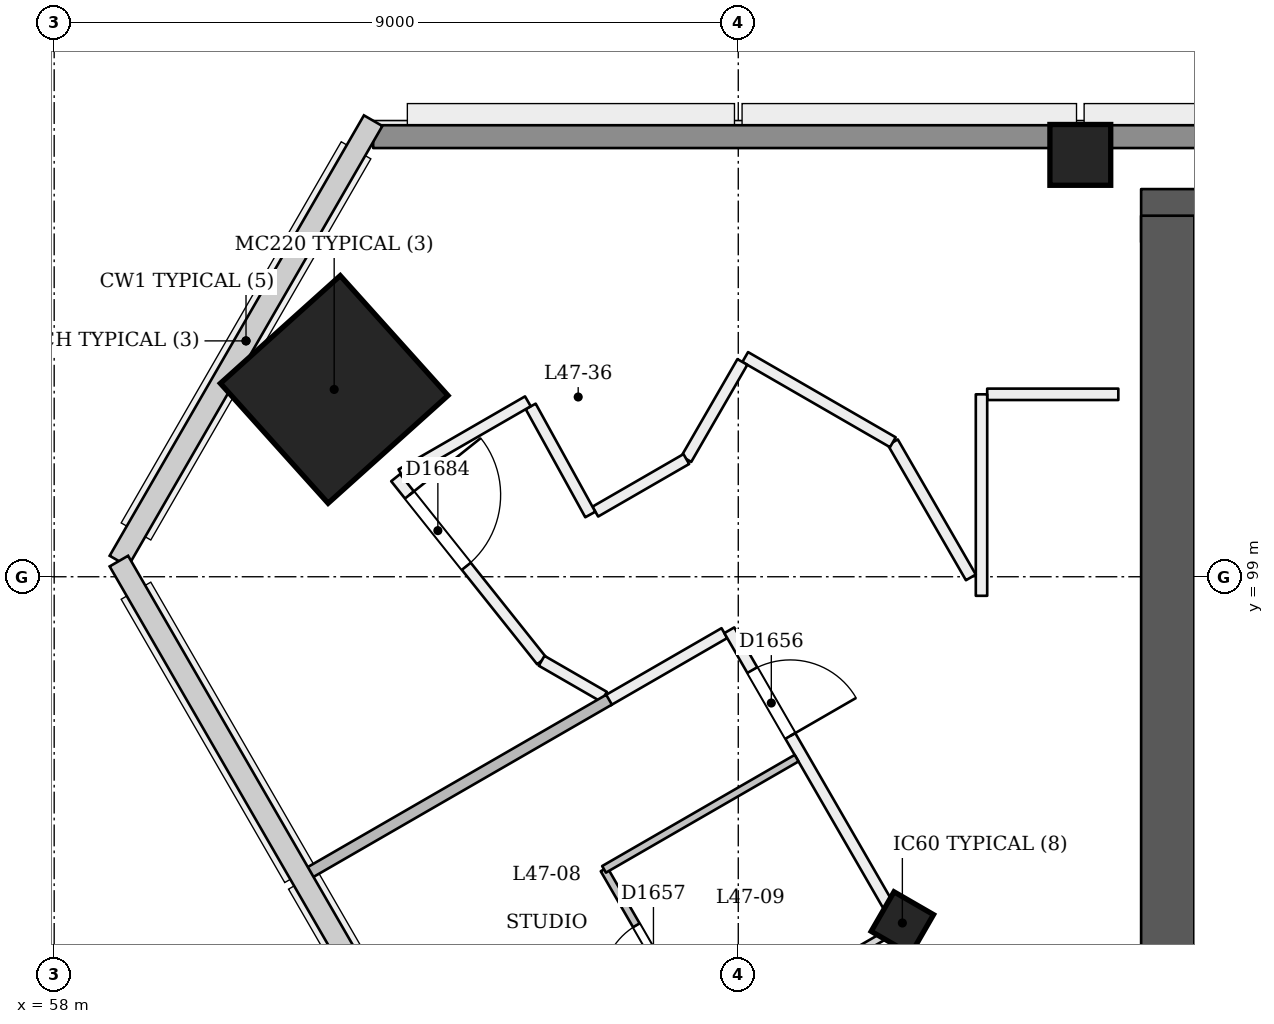
"""IFC4 building model, lengths in metres.
Left out: names, types, materials, properties, quantities, classifications, styles, units other than length and angle.
Written with IfcOpenShell. Run it as: python <this file> out.ifc"""

import sys

from ifc_helpers import new_model, si_unit, direction, frame, frame_2d, origin, origin_2d, place, context, subcontext, project, spatial, rectangle, extrude, element, fill, save


model = new_model("IFC4")
c1 = context("Model", 3, precision=1e-05, world=origin(), true_north=direction((0.0, 1.0)))
c2 = subcontext(c1, "Body", "Model", "MODEL_VIEW")
j1 = project(units=[si_unit("LENGTHUNIT", "METRE"), si_unit("PLANEANGLEUNIT", "RADIAN")], contexts=[c1])
p1 = place(None, origin())
s1 = spatial("IfcSite", under=j1, at=p1, CompositionType="ELEMENT")
p2 = place(p1, origin())
s2 = spatial("IfcBuilding", under=s1, at=p2, CompositionType="ELEMENT")
p3 = place(p2, frame((0.0, 0.0, 181.8)))
s3 = spatial("IfcBuildingStorey", under=s2, at=p3, CompositionType="ELEMENT", Elevation=181.8)
p4 = place(p3, frame((97.35, 103.75, 0.0), z_axis=(0.0, 0.0, 1.0), x_axis=(-1.0, 0.0, 0.0)))
e1 = element("IfcWall", 1, at=p4, inside=s3, PredefinedType="SHEAR", context=c2, shape_type="SweptSolid", body=[
    extrude(rectangle(XDim=25.05, YDim=0.7, at=frame_2d((12.525, 0.0))), origin(), (0.0, 0.0, 1.0), 3.6),
])
p5 = place(p3, frame((72.65, 103.75, 0.0), z_axis=(0.0, 0.0, 1.0), x_axis=(0.0, -1.0, 0.0)))
e2 = element("IfcWall", 2, at=p5, inside=s3, PredefinedType="SHEAR", context=c2, shape_type="SweptSolid", body=[
    extrude(rectangle(XDim=11.05, YDim=0.7, at=frame_2d((5.525, 0.0))), origin(), (0.0, 0.0, 1.0), 3.6),
])
p6 = place(p3, frame((69.132, 94.398, -0.018), z_axis=(0.02215369191, 0.038413282303, 0.999016333038), x_axis=(-0.865360860763, -0.499675692985, 0.038402897016)))
e3 = element("IfcColumn", 3, at=p6, inside=s3, PredefinedType="COLUMN", context=c2, shape_type="SweptSolid", body=[
    extrude(rectangle(XDim=0.6, YDim=0.6, at=origin_2d()), origin(), (0.0, 0.0, 1.0), 3.604),
])
p7 = place(p3, frame((61.65, 101.453, 0.0), z_axis=(0.028403739082, 0.009219352065, 0.999554016126), x_axis=(-0.865117148267, 0.501172504354, 0.019960978266)))
e4 = element("IfcColumn", 4, at=p7, inside=s3, PredefinedType="COLUMN", context=c2, shape_type="SweptSolid", body=[
    extrude(rectangle(XDim=2.12, YDim=2.12, at=origin_2d()), origin(), (0.0, 0.0, 1.0), 3.602),
])
p8 = place(p3, frame((71.5, 104.55, 0.0), z_axis=(0.0, 0.0, 1.0), x_axis=(1.0, 0.0, 0.0)))
e5 = element("IfcColumn", 5, at=p8, inside=s3, PredefinedType="COLUMN", context=c2, shape_type="SweptSolid", body=[
    extrude(rectangle(XDim=0.8, YDim=0.8, at=origin_2d()), origin(), (0.0, 0.0, 1.0), 3.6),
])
p9 = place(p3, frame((65.28, 97.371, 0.0), z_axis=(0.0, 0.0, 1.0), x_axis=(0.865965678975, 0.50010343214, 0.0)))
e6 = element("IfcWall", 6, at=p9, inside=s3, PredefinedType="PARTITIONING", context=c2, shape_type="SweptSolid", body=[
    extrude(rectangle(XDim=1.775, YDim=0.15, at=frame_2d((0.887, 0.0))), origin(), (0.0, 0.0, 1.0), 3.15),
])
p10 = place(p3, frame((66.882, 98.296, 0.0), z_axis=(0.0, 0.0, 1.0), x_axis=(0.500009088543, -0.866020156448, 0.0)))
e7 = element("IfcWall", 7, at=p10, inside=s3, PredefinedType="PARTITIONING", context=c2, shape_type="SweptSolid", body=[
    extrude(rectangle(XDim=6.636, YDim=0.15, at=frame_2d((3.318, 0.0))), origin(), (0.0, 0.0, 1.0), 2.75),
])
p11 = place(p10, frame((0.605, 0.0, 0.0)))
e8 = element("IfcOpeningElement", 8, at=p11, cuts=e7, PredefinedType="OPENING", context=c2, shape_type="SweptSolid", body=[
    extrude(rectangle(XDim=1.0, YDim=2.1, at=frame_2d((0.5, 1.05))), frame((0.0, 0.085, 0.0), z_axis=(0.0, -1.0, 0.0), x_axis=(1.0, 0.0, 0.0)), (0.0, 0.0, 1.0), 0.171),
])
p12 = place(p3, frame((72.0, 101.4, 0.0), z_axis=(0.0, 0.0, 1.0), x_axis=(-1.0, 0.0, 0.0)))
e9 = element("IfcWall", 9, at=p12, inside=s3, PredefinedType="PARTITIONING", context=c2, shape_type="SweptSolid", body=[
    extrude(rectangle(XDim=1.725, YDim=0.15, at=frame_2d((0.863, 0.0))), origin(), (0.0, 0.0, 1.0), 3.15),
])
p13 = place(p3, frame((70.2, 101.4, 0.0), z_axis=(0.0, 0.0, 1.0), x_axis=(0.0, -1.0, 0.0)))
e10 = element("IfcWall", 10, at=p13, inside=s3, PredefinedType="PARTITIONING", context=c2, shape_type="SweptSolid", body=[
    extrude(rectangle(XDim=2.651, YDim=0.15, at=frame_2d((1.325, 0.0))), origin(), (0.0, 0.0, 1.0), 3.15),
])
p14 = place(p3, frame((70.06, 98.992, 0.0), z_axis=(0.0, 0.0, 1.0), x_axis=(-0.500027893485, 0.866009298874, 0.0)))
e11 = element("IfcWall", 11, at=p14, inside=s3, PredefinedType="PARTITIONING", context=c2, shape_type="SweptSolid", body=[
    extrude(rectangle(XDim=2.053, YDim=0.15, at=frame_2d((1.026, 0.0))), origin(), (0.0, 0.0, 1.0), 3.15),
])
p15 = place(p3, frame((69.034, 100.769, 0.0), z_axis=(0.0, 0.0, 1.0), x_axis=(-0.866016984105, 0.500014583029, 0.0)))
e12 = element("IfcWall", 12, at=p15, inside=s3, PredefinedType="PARTITIONING", context=c2, shape_type="SweptSolid", body=[
    extrude(rectangle(XDim=2.243, YDim=0.15, at=frame_2d((1.121, 0.0))), origin(), (0.0, 0.0, 1.0), 3.15),
])
p16 = place(p3, frame((67.054, 101.826, 0.0), z_axis=(0.0, 0.0, 1.0), x_axis=(-0.500037662692, -0.866003658127, 0.0)))
e13 = element("IfcWall", 13, at=p16, inside=s3, PredefinedType="PARTITIONING", context=c2, shape_type="SweptSolid", body=[
    extrude(rectangle(XDim=1.475, YDim=0.15, at=frame_2d((0.738, 0.0))), origin(), (0.0, 0.0, 1.0), 3.15),
])
p17 = place(p3, frame((66.316, 100.548, 0.0), z_axis=(0.0, 0.0, 1.0), x_axis=(-0.866050310653, -0.499956857557, 0.0)))
e14 = element("IfcWall", 14, at=p17, inside=s3, PredefinedType="PARTITIONING", context=c2, shape_type="SweptSolid", body=[
    extrude(rectangle(XDim=1.382, YDim=0.15, at=frame_2d((0.691, 0.0))), origin(), (0.0, 0.0, 1.0), 3.15),
])
p18 = place(p3, frame((65.053, 99.819, 0.0), z_axis=(0.0, 0.0, 1.0), x_axis=(-0.48287067251, 0.875691677264, 0.0)))
e15 = element("IfcWall", 15, at=p18, inside=s3, PredefinedType="PARTITIONING", context=c2, shape_type="SweptSolid", body=[
    extrude(rectangle(XDim=1.624, YDim=0.15, at=frame_2d((0.812, 0.0))), origin(), (0.0, 0.0, 1.0), 3.15),
])
p19 = place(p3, frame((64.232, 101.308, 0.0), z_axis=(0.0, 0.0, 1.0), x_axis=(-0.866037476477, -0.499979088899, 0.0)))
e16 = element("IfcWall", 16, at=p19, inside=s3, PredefinedType="PARTITIONING", context=c2, shape_type="SweptSolid", body=[
    extrude(rectangle(XDim=1.921, YDim=0.15, at=frame_2d((0.961, 0.0))), origin(), (0.0, 0.0, 1.0), 3.15),
])
p20 = place(p3, frame((62.492, 100.303, 0.0), z_axis=(0.0, 0.0, 1.0), x_axis=(0.623399088772, -0.781903815132, 0.0)))
e17 = element("IfcWall", 17, at=p20, inside=s3, PredefinedType="PARTITIONING", context=c2, shape_type="SweptSolid", body=[
    extrude(rectangle(XDim=3.081, YDim=0.15, at=frame_2d((1.54, 0.0))), origin(), (0.0, 0.0, 1.0), 3.15),
])
p21 = place(p20, frame((0.291, 0.0, 0.0)))
e18 = element("IfcOpeningElement", 18, at=p21, cuts=e17, PredefinedType="OPENING", context=c2, shape_type="SweptSolid", body=[
    extrude(rectangle(XDim=1.2, YDim=2.1, at=frame_2d((0.6, 1.05))), frame((0.0, 0.085, 0.0), z_axis=(0.0, -1.0, 0.0), x_axis=(1.0, 0.0, 0.0)), (0.0, 0.0, 1.0), 0.171),
])
p22 = place(p3, frame((64.413, 97.895, 0.0), z_axis=(0.0, 0.0, 1.0), x_axis=(0.865919612642, -0.500183190883, 0.0)))
e19 = element("IfcWall", 19, at=p22, inside=s3, PredefinedType="PARTITIONING", context=c2, shape_type="SweptSolid", body=[
    extrude(rectangle(XDim=0.948, YDim=0.15, at=frame_2d((0.474, 0.0))), origin(), (0.0, 0.0, 1.0), 3.15),
])
p23 = place(p3, frame((67.834, 90.647, 0.0), z_axis=(0.0, 0.0, 1.0), x_axis=(-0.500027264788, 0.866009661879, 0.0)))
e20 = element("IfcWall", 20, at=p23, inside=s3, PredefinedType="PARTITIONING", context=c2, shape_type="SweptSolid", body=[
    extrude(rectangle(XDim=5.2, YDim=0.1, at=frame_2d((2.6, 0.0))), origin(), (0.0, 0.0, 1.0), 2.75),
])
p24 = place(p23, frame((3.45, 0.0, 0.0)))
e21 = element("IfcOpeningElement", 21, at=p24, cuts=e20, PredefinedType="OPENING", context=c2, shape_type="SweptSolid", body=[
    extrude(rectangle(XDim=0.9, YDim=2.1, at=frame_2d((0.45, 1.05))), frame((0.0, 0.061, 0.0), z_axis=(0.0, -1.0, 0.0), x_axis=(1.0, 0.0, 0.0)), (0.0, 0.0, 1.0), 0.121),
])
p25 = place(p23, frame((0.859, 0.0, 0.0)))
e22 = element("IfcOpeningElement", 22, at=p25, cuts=e20, PredefinedType="OPENING", context=c2, shape_type="SweptSolid", body=[
    extrude(rectangle(XDim=0.9, YDim=2.1, at=frame_2d((0.45, 1.05))), frame((0.0, 0.061, 0.0), z_axis=(0.0, -1.0, 0.0), x_axis=(1.0, 0.0, 0.0)), (0.0, 0.0, 1.0), 0.121),
])
p26 = place(p3, frame((65.234, 95.15, 0.0), z_axis=(0.0, 0.0, 1.0), x_axis=(0.86601045545, 0.500025890382, 0.0)))
e23 = element("IfcWall", 23, at=p26, inside=s3, PredefinedType="PARTITIONING", context=c2, shape_type="SweptSolid", body=[
    extrude(rectangle(XDim=2.925, YDim=0.1, at=frame_2d((1.462, 0.0))), origin(), (0.0, 0.0, 1.0), 3.15),
])
p27 = place(p3, frame((65.3, 97.383, 0.0), z_axis=(0.0, 0.0, 1.0), x_axis=(-0.866033350373, -0.499986235851, 0.0)))
e24 = element("IfcWall", 24, at=p27, inside=s3, PredefinedType="PARTITIONING", context=c2, shape_type="SweptSolid", body=[
    extrude(rectangle(XDim=4.594, YDim=0.15, at=frame_2d((2.297, 0.0))), origin(), (0.0, 0.0, 1.0), 2.65),
])
p28 = place(p3, frame((66.577, 92.924, 0.0), z_axis=(0.0, 0.0, 1.0), x_axis=(0.866018712932, 0.500011588718, 0.0)))
e25 = element("IfcWall", 25, at=p28, inside=s3, PredefinedType="PARTITIONING", context=c2, shape_type="SweptSolid", body=[
    extrude(rectangle(XDim=2.875, YDim=0.1, at=frame_2d((1.438, 0.0))), origin(), (0.0, 0.0, 1.0), 2.75),
])
p29 = place(p3, frame((62.196, 104.79, 0.0), z_axis=(0.0, 0.0, 1.0), x_axis=(1.0, 0.0, 0.0)))
e26 = element("IfcWall", 26, at=p29, inside=s3, PredefinedType="SOLIDWALL", context=c2, shape_type="SweptSolid", body=[
    extrude(rectangle(XDim=45.607, YDim=0.3, at=frame_2d((22.804, 0.0))), origin(), (0.0, 0.0, 1.0), 2.65),
])
p30 = place(p11, origin())
e27 = element("IfcDoor", 27, at=p30, inside=s3, OperationType="SINGLE_SWING_RIGHT", PredefinedType="NOTDEFINED", context=c2, shape_type="SweptSolid", body=[
    extrude(rectangle(XDim=1.0, YDim=2.1, at=frame_2d((0.5, 1.05))), frame((0.0, 0.025, 0.0), z_axis=(0.0, -1.0, 0.0), x_axis=(1.0, 0.0, 0.0)), (0.0, 0.0, 1.0), 0.05),
])
fill(e8, e27)
p31 = place(p24, origin())
e28 = element("IfcDoor", 28, at=p31, inside=s3, OperationType="SINGLE_SWING_LEFT", PredefinedType="NOTDEFINED", context=c2, shape_type="SweptSolid", body=[
    extrude(rectangle(XDim=0.9, YDim=2.1, at=frame_2d((0.45, 1.05))), frame((0.0, 0.025, 0.0), z_axis=(0.0, -1.0, 0.0), x_axis=(1.0, 0.0, 0.0)), (0.0, 0.0, 1.0), 0.05),
])
fill(e21, e28)
p32 = place(p21, origin())
e29 = element("IfcDoor", 29, at=p32, inside=s3, OperationType="SINGLE_SWING_LEFT", PredefinedType="NOTDEFINED", context=c2, shape_type="SweptSolid", body=[
    extrude(rectangle(XDim=1.2, YDim=2.1, at=frame_2d((0.6, 1.05))), frame((0.0, 0.025, 0.0), z_axis=(0.0, -1.0, 0.0), x_axis=(1.0, 0.0, 0.0)), (0.0, 0.0, 1.0), 0.05),
])
fill(e18, e29)
save(model, sys.argv[1])
